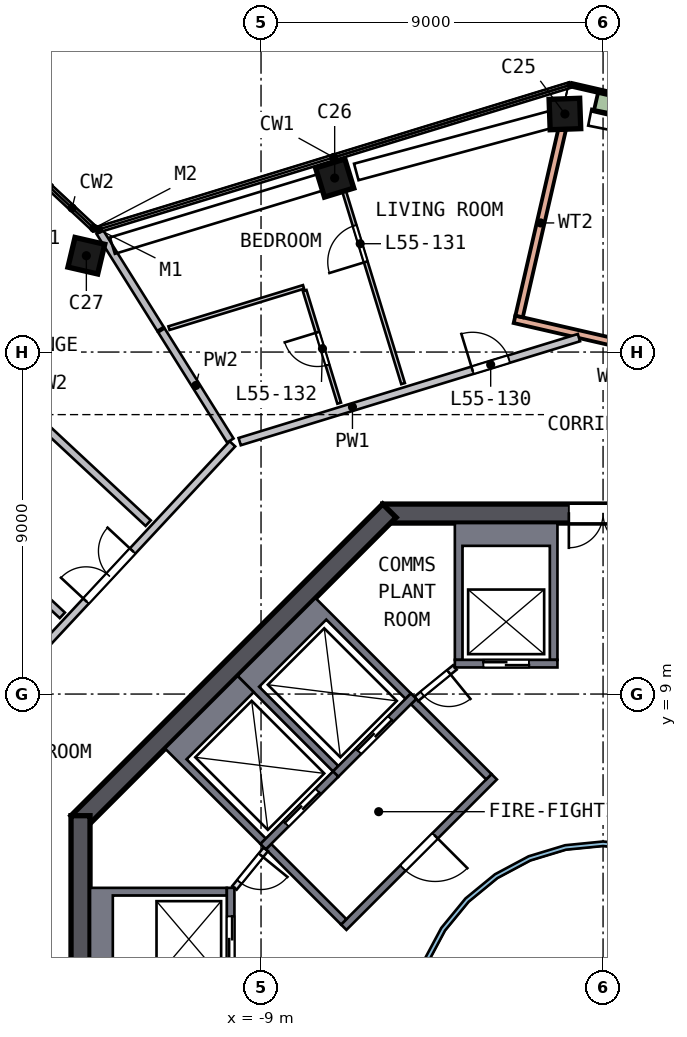
"""IFC4 building model, lengths in metres.
Left out: names, types, materials, properties, quantities, classifications, styles, units other than length and angle.
Written with IfcOpenShell. Run it as: python <this file> out.ifc"""

import sys

from ifc_helpers import new_model, si_unit, direction, frame, frame_2d, origin, origin_2d, place, context, subcontext, project, spatial, polyline, rectangle, outline, extrude, element, fill, save


model = new_model("IFC4")
c1 = context("Model", 3, precision=1e-05, world=origin(), true_north=direction((0.0, 1.0)))
c2 = subcontext(c1, "Body", "Model", "MODEL_VIEW")
j1 = project(units=[si_unit("LENGTHUNIT", "METRE"), si_unit("PLANEANGLEUNIT", "RADIAN")], contexts=[c1])
p1 = place(None, origin())
s1 = spatial("IfcSite", under=j1, at=p1, CompositionType="ELEMENT")
p2 = place(p1, origin())
s2 = spatial("IfcBuilding", under=s1, at=p2, CompositionType="ELEMENT")
p3 = place(p2, frame((0.0, 0.0, 227.0)))
s3 = spatial("IfcBuildingStorey", under=s2, at=p3, CompositionType="ELEMENT", Elevation=227.0)
p4 = place(p3, frame((-0.865, 24.271, 0.0), z_axis=(-0.115401674, -0.005093486, 0.993305849), x_axis=(0.992676314, 0.035372235, 0.115509918)))
e1 = element("IfcColumn", 1, at=p4, inside=s3, PredefinedType="COLUMN", context=c2, shape_type="SweptSolid", body=[
    extrude(rectangle(XDim=0.8, YDim=0.8, at=origin_2d()), origin(), (0.0, 0.0, 1.0), 3.211),
])
p5 = place(p3, frame((-6.933, 22.62, 0.0), z_axis=(-0.107304475, -0.033841596, 0.993650087), x_axis=(-0.950141415, -0.290813838, -0.112510462)))
e2 = element("IfcColumn", 2, at=p5, inside=s3, PredefinedType="COLUMN", context=c2, shape_type="SweptSolid", body=[
    extrude(rectangle(XDim=0.8, YDim=0.8, at=origin_2d()), origin(), (0.0, 0.0, 1.0), 3.21),
])
p6 = place(p3, frame((-13.479, 20.614, 0.0), z_axis=(-0.097442412, -0.064910936, 0.993122121), x_axis=(0.969869897, -0.230070903, 0.080123424)))
e3 = element("IfcColumn", 3, at=p6, inside=s3, PredefinedType="COLUMN", context=c2, shape_type="SweptSolid", body=[
    extrude(rectangle(XDim=0.8, YDim=0.8, at=origin_2d()), origin(), (0.0, 0.0, 1.0), 3.212),
])
p7 = place(p3, frame((5.799, 13.75, 0.0), z_axis=(0.0, 0.0, 1.0), x_axis=(-1.0, 0.0, 0.0)))
e4 = element("IfcWall", 4, at=p7, inside=s3, PredefinedType="SHEAR", context=c2, shape_type="SweptSolid", body=[
    extrude(rectangle(XDim=11.598, YDim=0.5, at=frame_2d((5.799, 0.0))), origin(), (0.0, 0.0, 1.0), 3.5),
])
p8 = place(p7, frame((4.899, 0.0, 0.0)))
e5 = element("IfcOpeningElement", 5, at=p8, cuts=e4, PredefinedType="OPENING", context=c2, shape_type="SweptSolid", body=[
    extrude(rectangle(XDim=1.8, YDim=2.1, at=frame_2d((0.9, 1.05))), frame((0.0, 0.26, 0.0), z_axis=(0.0, -1.0, 0.0), x_axis=(1.0, 0.0, 0.0)), (0.0, 0.0, 1.0), 0.52),
])
p9 = place(p3, frame((-5.622, 13.823, 0.0), z_axis=(0.0, 0.0, 1.0), x_axis=(-0.707106781, -0.707106781, 0.0)))
e6 = element("IfcWall", 6, at=p9, inside=s3, PredefinedType="SHEAR", context=c2, shape_type="SweptSolid", body=[
    extrude(rectangle(XDim=11.598, YDim=0.5, at=frame_2d((5.799, 0.0))), origin(), (0.0, 0.0, 1.0), 3.5),
])
p10 = place(p3, frame((-13.75, 5.799, 0.0), z_axis=(0.0, 0.0, 1.0), x_axis=(0.0, -1.0, 0.0)))
e7 = element("IfcWall", 7, at=p10, inside=s3, PredefinedType="SHEAR", context=c2, shape_type="SweptSolid", body=[
    extrude(rectangle(XDim=11.598, YDim=0.5, at=frame_2d((5.799, 0.0))), origin(), (0.0, 0.0, 1.0), 3.5),
])
p11 = place(p10, frame((4.899, 0.0, 0.0)))
e8 = element("IfcOpeningElement", 8, at=p11, cuts=e7, PredefinedType="OPENING", context=c2, shape_type="SweptSolid", body=[
    extrude(rectangle(XDim=1.8, YDim=2.1, at=frame_2d((0.9, 1.05))), frame((0.0, 0.26, 0.0), z_axis=(0.0, -1.0, 0.0), x_axis=(1.0, 0.0, 0.0)), (0.0, 0.0, 1.0), 0.52),
])
p12 = place(p3, frame((-2.329, 18.861, 0.0), z_axis=(0.0, 0.0, 1.0), x_axis=(0.974527119, -0.224269692, 0.0)))
e9 = element("IfcWall", 9, at=p12, inside=s3, PredefinedType="SOLIDWALL", context=c2, shape_type="SweptSolid", body=[
    extrude(rectangle(XDim=13.0, YDim=0.2, at=frame_2d((6.5, 0.0))), origin(), (0.0, 0.0, 1.0), 3.19),
])
p13 = place(p12, frame((5.6, 0.0, 0.0)))
e10 = element("IfcOpeningElement", 10, at=p13, cuts=e9, PredefinedType="OPENING", context=c2, shape_type="SweptSolid", body=[
    extrude(rectangle(XDim=1.8, YDim=2.4, at=frame_2d((0.9, 1.2))), frame((0.0, 0.11, 0.0), z_axis=(0.0, -1.0, 0.0), x_axis=(1.0, 0.0, 0.0)), (0.0, 0.0, 1.0), 0.22),
])
p14 = place(p3, frame((-1.076, 23.86, 0.0), z_axis=(0.0, 0.0, 1.0), x_axis=(-0.224277121, -0.974525409, 0.0)))
e11 = element("IfcWall", 11, at=p14, inside=s3, PredefinedType="SOLIDWALL", context=c2, shape_type="SweptSolid", body=[
    extrude(rectangle(XDim=5.052, YDim=0.2, at=frame_2d((2.526, 0.0))), origin(), (0.0, 0.0, 1.0), 3.19),
])
p15 = place(p3, frame((11.686, 22.152, 0.0), z_axis=(0.0, 0.0, 1.0), x_axis=(-0.974526893, 0.224270671, 0.0)))
e12 = element("IfcWall", 12, at=p15, inside=s3, PredefinedType="SOLIDWALL", context=c2, shape_type="SweptSolid", body=[
    extrude(rectangle(XDim=12.84, YDim=0.1, at=frame_2d((6.42, 0.0))), origin(), (0.0, 0.0, 1.0), 0.7),
])
p16 = place(p3, frame((4.523, 23.492, 0.0), z_axis=(0.0, 0.0, 1.0), x_axis=(-0.974528043, 0.224265677, 0.0)))
e13 = element("IfcWall", 13, at=p16, inside=s3, PredefinedType="SOLIDWALL", context=c2, shape_type="SweptSolid", body=[
    extrude(rectangle(XDim=4.834, YDim=0.5, at=frame_2d((2.417, 0.0))), origin(), (0.0, 0.0, 1.0), 0.7),
])
p17 = place(p3, origin())
e14 = element("IfcWall", 14, at=p17, inside=s3, PredefinedType="SOLIDWALL", context=c2, shape_type="SweptSolid", body=[
    extrude(outline(polyline([(-3.9, 13.5), (-1.2, 13.5), (-1.2, 9.9), (-1.4, 9.9), (-1.4, 12.9), (-3.7, 12.9), (-3.7, 9.9), (-3.9, 9.9), (-3.9, 13.5)])), origin(), (0.0, 0.0, 1.0), 3.19),
])
p18 = place(p3, frame((-1.2, 9.8, 0.0), z_axis=(0.0, 0.0, 1.0), x_axis=(-1.0, 0.0, 0.0)))
e15 = element("IfcWall", 15, at=p18, inside=s3, PredefinedType="SOLIDWALL", context=c2, shape_type="SweptSolid", body=[
    extrude(rectangle(XDim=2.7, YDim=0.2, at=frame_2d((1.35, 0.0))), origin(), (0.0, 0.0, 1.0), 3.19),
])
p19 = place(p18, frame((0.75, 0.0, 0.0)))
e16 = element("IfcOpeningElement", 16, at=p19, cuts=e15, PredefinedType="OPENING", context=c2, shape_type="SweptSolid", body=[
    extrude(rectangle(XDim=1.2, YDim=2.1, at=frame_2d((0.6, 1.05))), frame((0.0, 0.11, 0.0), z_axis=(0.0, -1.0, 0.0), x_axis=(1.0, 0.0, 0.0)), (0.0, 0.0, 1.0), 0.22),
])
p20 = place(p3, origin())
e17 = element("IfcWall", 17, at=p20, inside=s3, PredefinedType="SOLIDWALL", context=c2, shape_type="SweptSolid", body=[
    extrude(outline(polyline([(-13.5, 3.9), (-9.9, 3.9), (-9.9, 3.7), (-12.9, 3.7), (-12.9, 1.4), (-9.9, 1.4), (-9.9, 1.2), (-13.5, 1.2), (-13.5, 3.9)])), origin(), (0.0, 0.0, 1.0), 3.19),
])
p21 = place(p3, frame((-9.8, 1.2, 0.0), z_axis=(0.0, 0.0, 1.0), x_axis=(0.0, 1.0, 0.0)))
e18 = element("IfcWall", 18, at=p21, inside=s3, PredefinedType="SOLIDWALL", context=c2, shape_type="SweptSolid", body=[
    extrude(rectangle(XDim=2.7, YDim=0.2, at=frame_2d((1.35, 0.0))), origin(), (0.0, 0.0, 1.0), 3.19),
])
p22 = place(p21, frame((0.75, 0.0, 0.0)))
e19 = element("IfcOpeningElement", 19, at=p22, cuts=e18, PredefinedType="OPENING", context=c2, shape_type="SweptSolid", body=[
    extrude(rectangle(XDim=1.2, YDim=2.1, at=frame_2d((0.6, 1.05))), frame((0.0, 0.11, 0.0), z_axis=(0.0, -1.0, 0.0), x_axis=(1.0, 0.0, 0.0)), (0.0, 0.0, 1.0), 0.22),
])
p23 = place(p3, origin())
e20 = element("IfcWall", 20, at=p23, inside=s3, PredefinedType="SOLIDWALL", context=c2, shape_type="SweptSolid", body=[
    extrude(outline(polyline([(-9.617, 9.475), (-7.566, 11.526), (-5.056, 9.016), (-5.197, 8.874), (-7.283, 10.96), (-9.051, 9.192), (-6.965, 7.106), (-7.106, 6.965), (-9.617, 9.475)])), origin(), (0.0, 0.0, 1.0), 3.19),
])
p24 = place(p3, frame((-4.985, 8.945, 0.0), z_axis=(0.0, 0.0, 1.0), x_axis=(-0.707106781, -0.707106781, 0.0)))
e21 = element("IfcWall", 21, at=p24, inside=s3, PredefinedType="SOLIDWALL", context=c2, shape_type="SweptSolid", body=[
    extrude(rectangle(XDim=2.9, YDim=0.2, at=frame_2d((1.45, 0.0))), origin(), (0.0, 0.0, 1.0), 3.19),
])
p25 = place(p24, frame((0.85, 0.0, 0.0)))
e22 = element("IfcOpeningElement", 22, at=p25, cuts=e21, PredefinedType="OPENING", context=c2, shape_type="SweptSolid", body=[
    extrude(rectangle(XDim=1.2, YDim=2.1, at=frame_2d((0.6, 1.05))), frame((0.0, 0.11, 0.0), z_axis=(0.0, -1.0, 0.0), x_axis=(1.0, 0.0, 0.0)), (0.0, 0.0, 1.0), 0.22),
])
p26 = place(p3, origin())
e23 = element("IfcWall", 23, at=p26, inside=s3, PredefinedType="SOLIDWALL", context=c2, shape_type="SweptSolid", body=[
    extrude(outline(polyline([(-11.526, 7.566), (-9.617, 9.475), (-9.192, 9.051), (-10.96, 7.283), (-8.874, 5.197), (-9.016, 5.056), (-11.526, 7.566)])), origin(), (0.0, 0.0, 1.0), 3.19),
])
p27 = place(p3, frame((-7.036, 6.894, 0.0), z_axis=(0.0, 0.0, 1.0), x_axis=(-0.707106781, -0.707106781, 0.0)))
e24 = element("IfcWall", 24, at=p27, inside=s3, PredefinedType="SOLIDWALL", context=c2, shape_type="SweptSolid", body=[
    extrude(rectangle(XDim=2.7, YDim=0.2, at=frame_2d((1.35, 0.0))), origin(), (0.0, 0.0, 1.0), 3.19),
])
p28 = place(p27, frame((0.65, 0.0, 0.0)))
e25 = element("IfcOpeningElement", 25, at=p28, cuts=e24, PredefinedType="OPENING", context=c2, shape_type="SweptSolid", body=[
    extrude(rectangle(XDim=1.2, YDim=2.1, at=frame_2d((0.6, 1.05))), frame((0.0, 0.11, 0.0), z_axis=(0.0, -1.0, 0.0), x_axis=(1.0, 0.0, 0.0)), (0.0, 0.0, 1.0), 0.22),
])
p29 = place(p3, frame((-2.864, 6.823, 0.0), z_axis=(0.0, 0.0, 1.0), x_axis=(-0.707106781, -0.707106781, 0.0)))
e26 = element("IfcWall", 26, at=p29, inside=s3, PredefinedType="SOLIDWALL", context=c2, shape_type="SweptSolid", body=[
    extrude(rectangle(XDim=5.6, YDim=0.2, at=frame_2d((2.8, 0.0))), origin(), (0.0, 0.0, 1.0), 3.19),
])
p30 = place(p29, frame((2.2, 0.0, 0.0)))
e27 = element("IfcOpeningElement", 27, at=p30, cuts=e26, PredefinedType="OPENING", context=c2, shape_type="SweptSolid", body=[
    extrude(rectangle(XDim=1.2, YDim=2.1, at=frame_2d((0.6, 1.05))), frame((0.0, 0.11, 0.0), z_axis=(0.0, -1.0, 0.0), x_axis=(1.0, 0.0, 0.0)), (0.0, 0.0, 1.0), 0.22),
])
for number, where, z_axis, x_axis in (
    (28, (-3.005, 6.823, 0.0), (0.0, 0.0, 1.0), (-0.707, 0.707, 0.0)),
    (29, (-6.823, 3.005, 0.0), (0.0, 0.0, 1.0), (-0.707, 0.707, 0.0)),
):
    element("IfcWall", number, at=place(p3, frame(where, z_axis=z_axis, x_axis=x_axis)), inside=s3, PredefinedType="SOLIDWALL", context=c2, shape_type="SweptSolid", body=[
        extrude(rectangle(XDim=2.8, YDim=0.2, at=frame_2d((1.4, 0.0))), origin(), (0.0, 0.0, 1.0), 3.19),
    ])
p31 = place(p3, frame((-3.9, 9.7, 0.0), z_axis=(0.0, 0.0, 1.0), x_axis=(-0.775559878, -0.631274009, 0.0)))
e30 = element("IfcWall", 30, at=p31, inside=s3, PredefinedType="PARTITIONING", context=c2, shape_type="SweptSolid", body=[
    extrude(rectangle(XDim=1.308, YDim=0.15, at=frame_2d((0.654, 0.0))), origin(), (0.0, 0.0, 1.0), 3.19),
])
p32 = place(p31, frame((0.204, 0.0, 0.0)))
e31 = element("IfcOpeningElement", 31, at=p32, cuts=e30, PredefinedType="OPENING", context=c2, shape_type="SweptSolid", body=[
    extrude(rectangle(XDim=0.9, YDim=2.1, at=frame_2d((0.45, 1.05))), frame((0.0, 0.085, 0.0), z_axis=(0.0, -1.0, 0.0), x_axis=(1.0, 0.0, 0.0)), (0.0, 0.0, 1.0), 0.17),
])
p33 = place(p3, frame((-8.874, 4.914, 0.0), z_axis=(0.0, 0.0, 1.0), x_axis=(-0.631274009, -0.775559878, 0.0)))
e32 = element("IfcWall", 32, at=p33, inside=s3, PredefinedType="PARTITIONING", context=c2, shape_type="SweptSolid", body=[
    extrude(rectangle(XDim=1.308, YDim=0.15, at=frame_2d((0.654, 0.0))), origin(), (0.0, 0.0, 1.0), 3.19),
])
p34 = place(p33, frame((0.204, 0.0, 0.0)))
e33 = element("IfcOpeningElement", 33, at=p34, cuts=e32, PredefinedType="OPENING", context=c2, shape_type="SweptSolid", body=[
    extrude(rectangle(XDim=0.9, YDim=2.1, at=frame_2d((0.45, 1.05))), frame((0.0, 0.085, 0.0), z_axis=(0.0, -1.0, 0.0), x_axis=(1.0, 0.0, 0.0)), (0.0, 0.0, 1.0), 0.17),
])
p35 = place(p3, origin())
e34 = element("IfcWall", 34, at=p35, inside=s3, PredefinedType="SOLIDWALL", context=c2, shape_type="SweptSolid", body=[
    extrude(outline(polyline([(5.021, -0.999), (4.73, -1.959), (4.257, -2.844), (3.62, -3.62), (2.844, -4.257), (1.959, -4.73), (0.999, -5.021), (0.0, -5.12), (-0.999, -5.021), (-1.959, -4.73), (-2.844, -4.257), (-3.62, -3.62), (-4.257, -2.844), (-4.73, -1.959), (-5.021, -0.999), (-5.12, 0.0), (-5.021, 0.999), (-4.73, 1.959), (-4.257, 2.844), (-3.62, 3.62), (-2.844, 4.257), (-1.959, 4.73), (-0.999, 5.021), (0.0, 5.12), (0.999, 5.021), (1.959, 4.73), (2.844, 4.257), (3.62, 3.62), (4.257, 2.844), (4.73, 1.959), (5.021, 0.999), (5.12, 0.0), (5.021, -0.999)]), holes=[polyline([(4.904, 0.976), (4.619, 1.913), (4.157, 2.778), (3.535, 3.535), (2.778, 4.157), (1.913, 4.619), (0.976, 4.904), (0.0, 5.0), (-0.976, 4.904), (-1.913, 4.619), (-2.778, 4.157), (-3.535, 3.535), (-4.157, 2.778), (-4.619, 1.913), (-4.904, 0.976), (-5.0, 0.0), (-4.904, -0.976), (-4.619, -1.913), (-4.157, -2.778), (-3.535, -3.535), (-2.778, -4.157), (-1.913, -4.619), (-0.976, -4.904), (0.0, -5.0), (0.976, -4.904), (1.913, -4.619), (2.778, -4.157), (3.535, -3.535), (4.157, -2.778), (4.619, -1.913), (4.904, -0.976), (5.0, 0.0), (4.904, 0.976)])]), origin(), (0.0, 0.0, 1.0), 3.19),
])
p36 = place(p3, frame((-16.239, 8.62, 0.0), z_axis=(0.0, 0.0, 1.0), x_axis=(0.681478707, 0.731837941, 0.0)))
e35 = element("IfcWall", 35, at=p36, inside=s3, PredefinedType="SOLIDWALL", context=c2, shape_type="SweptSolid", body=[
    extrude(rectangle(XDim=9.517, YDim=0.2, at=frame_2d((4.758, 0.0))), origin(), (0.0, 0.0, 1.0), 3.19),
])
p37 = place(p36, frame((3.865, 0.0, 0.0)))
e36 = element("IfcOpeningElement", 36, at=p37, cuts=e35, PredefinedType="OPENING", context=c2, shape_type="SweptSolid", body=[
    extrude(rectangle(XDim=1.8, YDim=2.1, at=frame_2d((0.9, 1.05))), frame((0.0, 0.11, 0.0), z_axis=(0.0, -1.0, 0.0), x_axis=(1.0, 0.0, 0.0)), (0.0, 0.0, 1.0), 0.22),
])
p38 = place(p3, frame((-9.562, 15.643, 0.0), z_axis=(0.0, 0.0, 1.0), x_axis=(0.956105208, 0.293023601, 0.0)))
e37 = element("IfcWall", 37, at=p38, inside=s3, PredefinedType="SOLIDWALL", context=c2, shape_type="SweptSolid", body=[
    extrude(rectangle(XDim=9.337, YDim=0.2, at=frame_2d((4.668, 0.0))), origin(), (0.0, 0.0, 1.0), 3.19),
])
p39 = place(p38, frame((6.408, 0.0, 0.0)))
e38 = element("IfcOpeningElement", 38, at=p39, cuts=e37, PredefinedType="OPENING", context=c2, shape_type="SweptSolid", body=[
    extrude(rectangle(XDim=1.0, YDim=2.1, at=frame_2d((0.5, 1.05))), frame((0.0, 0.11, 0.0), z_axis=(0.0, -1.0, 0.0), x_axis=(1.0, 0.0, 0.0)), (0.0, 0.0, 1.0), 0.22),
])
p40 = place(p3, frame((-14.229, 11.072, 0.0), z_axis=(0.0, 0.0, 1.0), x_axis=(-0.731837547, 0.68147913, 0.0)))
e39 = element("IfcWall", 39, at=p40, inside=s3, PredefinedType="SOLIDWALL", context=c2, shape_type="SweptSolid", body=[
    extrude(rectangle(XDim=11.533, YDim=0.2, at=frame_2d((5.767, 0.0))), origin(), (0.0, 0.0, 1.0), 3.19),
])
p41 = place(p40, frame((3.45, 0.0, 0.0)))
e40 = element("IfcOpeningElement", 40, at=p41, cuts=e39, PredefinedType="OPENING", context=c2, shape_type="SweptSolid", body=[
    extrude(rectangle(XDim=1.0, YDim=2.1, at=frame_2d((0.5, 1.05))), frame((0.0, 0.11, 0.0), z_axis=(0.0, -1.0, 0.0), x_axis=(1.0, 0.0, 0.0)), (0.0, 0.0, 1.0), 0.22),
])
p42 = place(p3, frame((-20.41, 21.358, 0.0), z_axis=(0.0, 0.0, 1.0), x_axis=(0.731837547, -0.68147913, 0.0)))
e41 = element("IfcWall", 41, at=p42, inside=s3, PredefinedType="SOLIDWALL", context=c2, shape_type="SweptSolid", body=[
    extrude(rectangle(XDim=11.533, YDim=0.2, at=frame_2d((5.767, 0.0))), origin(), (0.0, 0.0, 1.0), 3.19),
])
p43 = place(p42, frame((1.5, 0.0, 0.0)))
e42 = element("IfcOpeningElement", 42, at=p43, cuts=e41, PredefinedType="OPENING", context=c2, shape_type="SweptSolid", body=[
    extrude(rectangle(XDim=1.0, YDim=2.1, at=frame_2d((0.5, 1.05))), frame((0.0, 0.11, 0.0), z_axis=(0.0, -1.0, 0.0), x_axis=(1.0, 0.0, 0.0)), (0.0, 0.0, 1.0), 0.22),
])
p44 = place(p3, frame((-13.244, 21.162, 0.0), z_axis=(0.0, 0.0, 1.0), x_axis=(0.530523518, -0.847670217, 0.0)))
e43 = element("IfcWall", 43, at=p44, inside=s3, PredefinedType="SOLIDWALL", context=c2, shape_type="SweptSolid", body=[
    extrude(rectangle(XDim=3.011, YDim=0.2, at=frame_2d((1.506, 0.0))), origin(), (0.0, 0.0, 1.0), 3.19),
])
p45 = place(p3, frame((-11.622, 18.57, 0.0), z_axis=(0.0, 0.0, 1.0), x_axis=(0.530506006, -0.847681177, 0.0)))
e44 = element("IfcWall", 44, at=p45, inside=s3, PredefinedType="SOLIDWALL", context=c2, shape_type="SweptSolid", body=[
    extrude(rectangle(XDim=3.418, YDim=0.2, at=frame_2d((1.709, 0.0))), origin(), (0.0, 0.0, 1.0), 3.19),
])
p46 = place(p3, frame((-7.881, 19.714, 0.0), z_axis=(0.0, 0.0, 1.0), x_axis=(-0.956113314, -0.292997151, 0.0)))
e45 = element("IfcWall", 45, at=p46, inside=s3, PredefinedType="PARTITIONING", context=c2, shape_type="SweptSolid", body=[
    extrude(rectangle(XDim=3.704, YDim=0.1, at=frame_2d((1.852, 0.0))), origin(), (0.0, 0.0, 1.0), 3.19),
])
p47 = place(p3, frame((-6.944, 16.655, 0.0), z_axis=(0.0, 0.0, 1.0), x_axis=(-0.293050781, 0.956096878, 0.0)))
e46 = element("IfcWall", 46, at=p47, inside=s3, PredefinedType="PARTITIONING", context=c2, shape_type="SweptSolid", body=[
    extrude(rectangle(XDim=3.1, YDim=0.1, at=frame_2d((1.55, 0.0))), origin(), (0.0, 0.0, 1.0), 3.19),
])
p48 = place(p47, frame((1.05, 0.0, 0.0)))
e47 = element("IfcOpeningElement", 47, at=p48, cuts=e46, PredefinedType="OPENING", context=c2, shape_type="SweptSolid", body=[
    extrude(rectangle(XDim=0.9, YDim=2.1, at=frame_2d((0.45, 1.05))), frame((0.0, 0.06, 0.0), z_axis=(0.0, -1.0, 0.0), x_axis=(1.0, 0.0, 0.0)), (0.0, 0.0, 1.0), 0.12),
])
p49 = place(p3, frame((-5.262, 17.17, 0.0), z_axis=(0.0, 0.0, 1.0), x_axis=(-0.293042397, 0.956099448, 0.0)))
e48 = element("IfcWall", 48, at=p49, inside=s3, PredefinedType="PARTITIONING", context=c2, shape_type="SweptSolid", body=[
    extrude(rectangle(XDim=6.15, YDim=0.1, at=frame_2d((3.075, 0.0))), origin(), (0.0, 0.0, 1.0), 3.19),
])
p50 = place(p49, frame((3.35, 0.0, 0.0)))
e49 = element("IfcOpeningElement", 49, at=p50, cuts=e48, PredefinedType="OPENING", context=c2, shape_type="SweptSolid", body=[
    extrude(rectangle(XDim=1.0, YDim=2.1, at=frame_2d((0.5, 1.05))), frame((0.0, 0.06, 0.0), z_axis=(0.0, -1.0, 0.0), x_axis=(1.0, 0.0, 0.0)), (0.0, 0.0, 1.0), 0.12),
])
p51 = place(p19, origin())
e50 = element("IfcDoor", 50, at=p51, inside=s3, OperationType="DOUBLE_DOOR_SLIDING", PredefinedType="DOOR", context=c2, shape_type="SweptSolid", body=[
    extrude(rectangle(XDim=1.2, YDim=2.1, at=frame_2d((0.6, 1.05))), frame((0.0, 0.025, 0.0), z_axis=(0.0, -1.0, 0.0), x_axis=(1.0, 0.0, 0.0)), (0.0, 0.0, 1.0), 0.05),
])
fill(e16, e50)
p52 = place(p22, origin())
e51 = element("IfcDoor", 51, at=p52, inside=s3, OperationType="DOUBLE_DOOR_SLIDING", PredefinedType="DOOR", context=c2, shape_type="SweptSolid", body=[
    extrude(rectangle(XDim=1.2, YDim=2.1, at=frame_2d((0.6, 1.05))), frame((0.0, 0.025, 0.0), z_axis=(0.0, -1.0, 0.0), x_axis=(1.0, 0.0, 0.0)), (0.0, 0.0, 1.0), 0.05),
])
fill(e19, e51)
p53 = place(p25, origin())
e52 = element("IfcDoor", 52, at=p53, inside=s3, OperationType="DOUBLE_DOOR_SLIDING", PredefinedType="DOOR", context=c2, shape_type="SweptSolid", body=[
    extrude(rectangle(XDim=1.2, YDim=2.1, at=frame_2d((0.6, 1.05))), frame((0.0, 0.025, 0.0), z_axis=(0.0, -1.0, 0.0), x_axis=(1.0, 0.0, 0.0)), (0.0, 0.0, 1.0), 0.05),
])
fill(e22, e52)
p54 = place(p28, origin())
e53 = element("IfcDoor", 53, at=p54, inside=s3, OperationType="DOUBLE_DOOR_SLIDING", PredefinedType="DOOR", context=c2, shape_type="SweptSolid", body=[
    extrude(rectangle(XDim=1.2, YDim=2.1, at=frame_2d((0.6, 1.05))), frame((0.0, 0.025, 0.0), z_axis=(0.0, -1.0, 0.0), x_axis=(1.0, 0.0, 0.0)), (0.0, 0.0, 1.0), 0.05),
])
fill(e25, e53)
p55 = place(p8, origin())
e54 = element("IfcDoor", 54, at=p55, inside=s3, OperationType="DOUBLE_DOOR_SINGLE_SWING", PredefinedType="DOOR", context=c2, shape_type="SweptSolid", body=[
    extrude(rectangle(XDim=1.8, YDim=2.1, at=frame_2d((0.9, 1.05))), frame((0.0, 0.025, 0.0), z_axis=(0.0, -1.0, 0.0), x_axis=(1.0, 0.0, 0.0)), (0.0, 0.0, 1.0), 0.05),
])
fill(e5, e54)
p56 = place(p30, origin())
e55 = element("IfcDoor", 55, at=p56, inside=s3, OperationType="SINGLE_SWING_LEFT", PredefinedType="DOOR", context=c2, shape_type="SweptSolid", body=[
    extrude(rectangle(XDim=1.2, YDim=2.1, at=frame_2d((0.6, 1.05))), frame((0.0, 0.025, 0.0), z_axis=(0.0, -1.0, 0.0), x_axis=(1.0, 0.0, 0.0)), (0.0, 0.0, 1.0), 0.05),
])
fill(e27, e55)
p57 = place(p32, origin())
e56 = element("IfcDoor", 56, at=p57, inside=s3, OperationType="SINGLE_SWING_LEFT", PredefinedType="DOOR", context=c2, shape_type="SweptSolid", body=[
    extrude(rectangle(XDim=0.9, YDim=2.1, at=frame_2d((0.45, 1.05))), frame((0.0, 0.025, 0.0), z_axis=(0.0, -1.0, 0.0), x_axis=(1.0, 0.0, 0.0)), (0.0, 0.0, 1.0), 0.05),
])
fill(e31, e56)
p58 = place(p34, origin())
e57 = element("IfcDoor", 57, at=p58, inside=s3, OperationType="SINGLE_SWING_LEFT", PredefinedType="DOOR", context=c2, shape_type="SweptSolid", body=[
    extrude(rectangle(XDim=0.9, YDim=2.1, at=frame_2d((0.45, 1.05))), frame((0.0, 0.025, 0.0), z_axis=(0.0, -1.0, 0.0), x_axis=(1.0, 0.0, 0.0)), (0.0, 0.0, 1.0), 0.05),
])
fill(e33, e57)
p59 = place(p37, origin())
e58 = element("IfcDoor", 58, at=p59, inside=s3, OperationType="DOUBLE_DOOR_SINGLE_SWING", PredefinedType="DOOR", context=c2, shape_type="SweptSolid", body=[
    extrude(rectangle(XDim=1.8, YDim=2.1, at=frame_2d((0.9, 1.05))), frame((0.0, 0.025, 0.0), z_axis=(0.0, -1.0, 0.0), x_axis=(1.0, 0.0, 0.0)), (0.0, 0.0, 1.0), 0.05),
])
fill(e36, e58)
p60 = place(p39, origin())
e59 = element("IfcDoor", 59, at=p60, inside=s3, OperationType="SINGLE_SWING_LEFT", PredefinedType="DOOR", context=c2, shape_type="SweptSolid", body=[
    extrude(rectangle(XDim=1.0, YDim=2.1, at=frame_2d((0.5, 1.05))), frame((0.0, 0.025, 0.0), z_axis=(0.0, -1.0, 0.0), x_axis=(1.0, 0.0, 0.0)), (0.0, 0.0, 1.0), 0.05),
])
fill(e38, e59)
p61 = place(p50, origin())
e60 = element("IfcDoor", 60, at=p61, inside=s3, OperationType="SINGLE_SWING_LEFT", PredefinedType="DOOR", context=c2, shape_type="SweptSolid", body=[
    extrude(rectangle(XDim=1.0, YDim=2.1, at=frame_2d((0.5, 1.05))), frame((0.0, 0.025, 0.0), z_axis=(0.0, -1.0, 0.0), x_axis=(1.0, 0.0, 0.0)), (0.0, 0.0, 1.0), 0.05),
])
fill(e49, e60)
p62 = place(p48, origin())
e61 = element("IfcDoor", 61, at=p62, inside=s3, OperationType="SINGLE_SWING_RIGHT", PredefinedType="DOOR", context=c2, shape_type="SweptSolid", body=[
    extrude(rectangle(XDim=0.9, YDim=2.1, at=frame_2d((0.45, 1.05))), frame((0.0, 0.025, 0.0), z_axis=(0.0, -1.0, 0.0), x_axis=(1.0, 0.0, 0.0)), (0.0, 0.0, 1.0), 0.05),
])
fill(e47, e61)
save(model, sys.argv[1])
